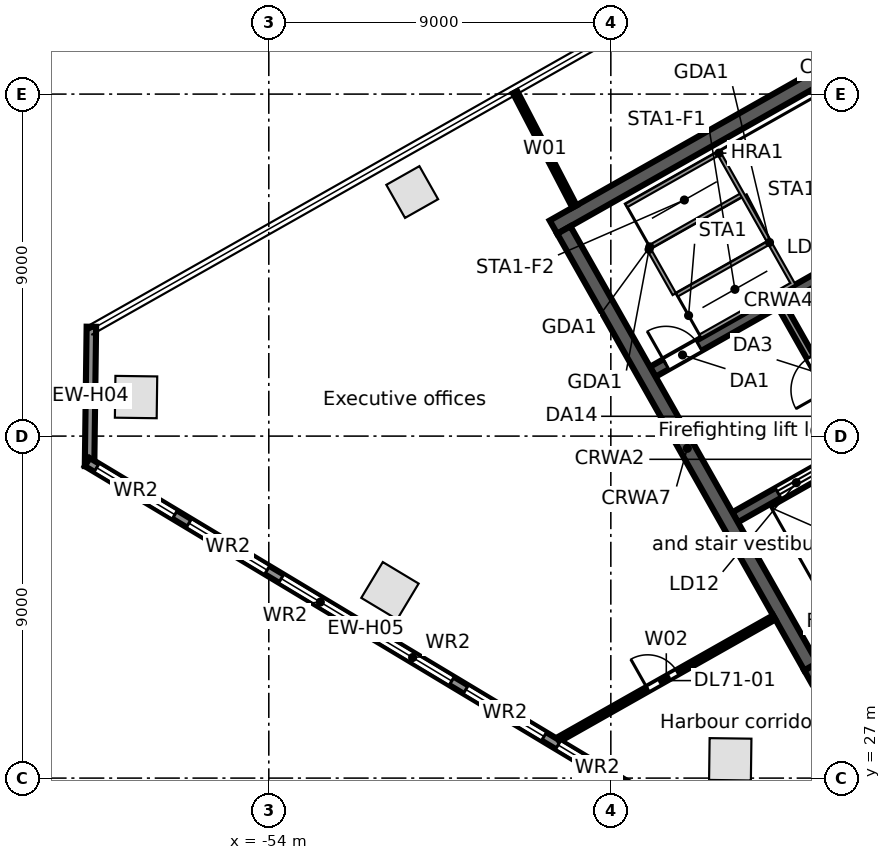
"""IFC4 building model, lengths in metres.
Left out: names, types, materials, properties, quantities, classifications, styles, units other than length and angle.
Written with IfcOpenShell. Run it as: python <this file> out.ifc"""

import sys

from ifc_helpers import new_model, si_unit, direction, frame, frame_2d, origin, origin_2d, place, context, subcontext, project, spatial, rectangle, extrude, element, fill, save


model = new_model("IFC4")
c1 = context("Model", 3, precision=1e-05, world=origin(), true_north=direction((0.0, 1.0)))
c2 = subcontext(c1, "Body", "Model", "MODEL_VIEW")
j1 = project(units=[si_unit("LENGTHUNIT", "METRE"), si_unit("PLANEANGLEUNIT", "RADIAN")], contexts=[c1])
p1 = place(None, origin())
s1 = spatial("IfcSite", under=j1, at=p1, CompositionType="ELEMENT")
p2 = place(p1, origin())
s2 = spatial("IfcBuilding", under=s1, at=p2, CompositionType="ELEMENT")
p3 = place(p2, frame((0.0, 0.0, 324.1)))
s3 = spatial("IfcBuildingStorey", under=s2, at=p3, CompositionType="ELEMENT", Elevation=324.1)
p4 = place(p3, frame((-50.226, 42.423, 0.0), z_axis=(0.0, 0.0, 1.0), x_axis=(-0.87035569594, -0.492423560103, 0.0)))
e1 = element("IfcColumn", 1, at=p4, inside=s3, PredefinedType="COLUMN", context=c2, shape_type="SweptSolid", body=[
    extrude(rectangle(XDim=1.0, YDim=1.0, at=origin_2d()), origin(), (0.0, 0.0, 1.0), 3.8),
])
for number, where, z_axis, x_axis in (
    (2, (-57.493, 37.027, 0.0), (0.0, 0.0, 1.0), (-0.013, -1.0, 0.0)),
    (3, (-50.812, 31.931, 0.0), (0.0, 0.0, 1.0), (0.857, -0.515, 0.0)),
    (4, (-41.858, 27.495, 0.0), (0.0, 0.0, 1.0), (1.0, -0.013, 0.0)),
):
    element("IfcColumn", number, at=place(p3, frame(where, z_axis=z_axis, x_axis=x_axis)), inside=s3, PredefinedType="COLUMN", context=c2, shape_type="SweptSolid", body=[
        extrude(rectangle(XDim=1.1, YDim=1.1, at=origin_2d()), origin(), (0.0, 0.0, 1.0), 3.8),
    ])
p5 = place(p3, frame((-58.717, 35.208, 0.0), z_axis=(0.0, 0.0, 1.0), x_axis=(0.01310512158, 0.999914124207, 0.0)))
e5 = element("IfcWall", 5, at=p5, inside=s3, PredefinedType="STANDARD", context=c2, shape_type="SweptSolid", body=[
    extrude(rectangle(XDim=3.67, YDim=0.25, at=frame_2d((1.835, 0.0))), origin(), (0.0, 0.0, 1.0), 3.52),
])
p6 = place(p3, frame((-44.115, 26.507, 0.0), z_axis=(0.0, 0.0, 1.0), x_axis=(-0.857166583633, 0.515039268311, 0.0)))
e6 = element("IfcWall", 6, at=p6, inside=s3, PredefinedType="STANDARD", context=c2, shape_type="SweptSolid", body=[
    extrude(rectangle(XDim=17.106, YDim=0.25, at=frame_2d((8.553, 0.0))), origin(), (0.0, 0.0, 1.0), 3.52),
])
p7 = place(p6, frame((14.417, 0.0, 0.8)))
e7 = element("IfcOpeningElement", 7, at=p7, cuts=e6, PredefinedType="OPENING", context=c2, shape_type="SweptSolid", body=[
    extrude(rectangle(XDim=2.4, YDim=2.2, at=frame_2d((1.2, 1.1))), frame((0.0, 0.135, 0.0), z_axis=(0.0, -1.0, 0.0), x_axis=(1.0, 0.0, 0.0)), (0.0, 0.0, 1.0), 0.27),
])
p8 = place(p6, frame((11.584, 0.0, 0.8)))
e8 = element("IfcOpeningElement", 8, at=p8, cuts=e6, PredefinedType="OPENING", context=c2, shape_type="SweptSolid", body=[
    extrude(rectangle(XDim=2.4, YDim=2.2, at=frame_2d((1.2, 1.1))), frame((0.0, 0.135, 0.0), z_axis=(0.0, -1.0, 0.0), x_axis=(1.0, 0.0, 0.0)), (0.0, 0.0, 1.0), 0.27),
])
p9 = place(p6, frame((8.75, 0.0, 0.8)))
e9 = element("IfcOpeningElement", 9, at=p9, cuts=e6, PredefinedType="OPENING", context=c2, shape_type="SweptSolid", body=[
    extrude(rectangle(XDim=2.4, YDim=2.2, at=frame_2d((1.2, 1.1))), frame((0.0, 0.135, 0.0), z_axis=(0.0, -1.0, 0.0), x_axis=(1.0, 0.0, 0.0)), (0.0, 0.0, 1.0), 0.27),
])
p10 = place(p6, frame((5.917, 0.0, 0.8)))
e10 = element("IfcOpeningElement", 10, at=p10, cuts=e6, PredefinedType="OPENING", context=c2, shape_type="SweptSolid", body=[
    extrude(rectangle(XDim=2.4, YDim=2.2, at=frame_2d((1.2, 1.1))), frame((0.0, 0.135, 0.0), z_axis=(0.0, -1.0, 0.0), x_axis=(1.0, 0.0, 0.0)), (0.0, 0.0, 1.0), 0.27),
])
p11 = place(p6, frame((3.084, 0.0, 0.8)))
e11 = element("IfcOpeningElement", 11, at=p11, cuts=e6, PredefinedType="OPENING", context=c2, shape_type="SweptSolid", body=[
    extrude(rectangle(XDim=2.4, YDim=2.2, at=frame_2d((1.2, 1.1))), frame((0.0, 0.135, 0.0), z_axis=(0.0, -1.0, 0.0), x_axis=(1.0, 0.0, 0.0)), (0.0, 0.0, 1.0), 0.27),
])
p12 = place(p6, frame((0.25, 0.0, 0.8)))
e12 = element("IfcOpeningElement", 12, at=p12, cuts=e6, PredefinedType="OPENING", context=c2, shape_type="SweptSolid", body=[
    extrude(rectangle(XDim=2.4, YDim=2.2, at=frame_2d((1.2, 1.1))), frame((0.0, 0.135, 0.0), z_axis=(0.0, -1.0, 0.0), x_axis=(1.0, 0.0, 0.0)), (0.0, 0.0, 1.0), 0.27),
])
p13 = place(p3, frame((-39.813, 29.662, 0.0), z_axis=(0.0, 0.0, 1.0), x_axis=(0.870350116061, 0.492433422375, 0.0)))
e13 = element("IfcWall", 13, at=p13, inside=s3, PredefinedType="SOLIDWALL", context=c2, shape_type="SweptSolid", body=[
    extrude(rectangle(XDim=17.0, YDim=0.4, at=frame_2d((8.5, 0.0))), origin(), (0.0, 0.0, 1.0), 3.52),
])
p14 = place(p13, frame((7.2, 0.0, 0.0)))
e14 = element("IfcOpeningElement", 14, at=p14, cuts=e13, PredefinedType="OPENING", context=c2, shape_type="SweptSolid", body=[
    extrude(rectangle(XDim=1.2, YDim=2.1, at=frame_2d((0.6, 1.05))), frame((0.0, 0.21, 0.0), z_axis=(0.0, -1.0, 0.0), x_axis=(1.0, 0.0, 0.0)), (0.0, 0.0, 1.0), 0.42),
])
p15 = place(p3, frame((-41.73, 33.863, 0.0), z_axis=(0.0, 0.0, 1.0), x_axis=(0.870350800578, 0.492432212525, 0.0)))
e15 = element("IfcWall", 15, at=p15, inside=s3, PredefinedType="SOLIDWALL", context=c2, shape_type="SweptSolid", body=[
    extrude(rectangle(XDim=6.2, YDim=0.3, at=frame_2d((3.1, 0.0))), origin(), (0.0, 0.0, 1.0), 3.52),
])
p16 = place(p15, frame((1.3, 0.0, 0.0)))
e16 = element("IfcOpeningElement", 16, at=p16, cuts=e15, PredefinedType="OPENING", context=c2, shape_type="SweptSolid", body=[
    extrude(rectangle(XDim=1.1, YDim=2.1, at=frame_2d((0.55, 1.05))), frame((0.0, 0.16, 0.0), z_axis=(0.0, -1.0, 0.0), x_axis=(1.0, 0.0, 0.0)), (0.0, 0.0, 1.0), 0.32),
])
p17 = place(p15, frame((4.95, 0.0, 0.0)))
e17 = element("IfcOpeningElement", 17, at=p17, cuts=e15, PredefinedType="OPENING", context=c2, shape_type="SweptSolid", body=[
    extrude(rectangle(XDim=0.9, YDim=2.1, at=frame_2d((0.45, 1.05))), frame((0.0, 0.16, 0.0), z_axis=(0.0, -1.0, 0.0), x_axis=(1.0, 0.0, 0.0)), (0.0, 0.0, 1.0), 0.32),
])
p18 = place(p3, frame((-43.897, 37.692, 0.0), z_axis=(0.0, 0.0, 1.0), x_axis=(0.870356351998, 0.492422400523, 0.0)))
e18 = element("IfcWall", 18, at=p18, inside=s3, PredefinedType="SOLIDWALL", context=c2, shape_type="SweptSolid", body=[
    extrude(rectangle(XDim=7.6, YDim=0.3, at=frame_2d((3.8, 0.0))), origin(), (0.0, 0.0, 1.0), 3.52),
])
p19 = place(p18, frame((0.4, 0.0, 0.0)))
e19 = element("IfcOpeningElement", 19, at=p19, cuts=e18, PredefinedType="OPENING", context=c2, shape_type="SweptSolid", body=[
    extrude(rectangle(XDim=1.0, YDim=2.1, at=frame_2d((0.5, 1.05))), frame((0.0, 0.16, 0.0), z_axis=(0.0, -1.0, 0.0), x_axis=(1.0, 0.0, 0.0)), (0.0, 0.0, 1.0), 0.32),
])
p20 = place(p3, frame((-46.51, 41.499, 0.0), z_axis=(0.0, 0.0, 1.0), x_axis=(0.870356271124, 0.492422543467, 0.0)))
e20 = element("IfcWall", 20, at=p20, inside=s3, PredefinedType="SOLIDWALL", context=c2, shape_type="SweptSolid", body=[
    extrude(rectangle(XDim=17.0, YDim=0.4, at=frame_2d((8.5, 0.0))), origin(), (0.0, 0.0, 1.0), 3.52),
])
p21 = place(p3, frame((-46.238, 41.423, 0.0), z_axis=(0.0, 0.0, 1.0), x_axis=(0.492421663121, -0.870356769198, 0.0)))
e21 = element("IfcWall", 21, at=p21, inside=s3, PredefinedType="SOLIDWALL", context=c2, shape_type="SweptSolid", body=[
    extrude(rectangle(XDim=13.2, YDim=0.4, at=frame_2d((6.6, 0.0))), origin(), (0.0, 0.0, 1.0), 3.52),
])
p22 = place(p3, frame((-40.516, 39.433, 0.0), z_axis=(0.0, 0.0, 1.0), x_axis=(0.492453559952, -0.87033872216, 0.0)))
e22 = element("IfcWall", 22, at=p22, inside=s3, PredefinedType="PARTITIONING", context=c2, shape_type="SweptSolid", body=[
    extrude(rectangle(XDim=4.1, YDim=0.2, at=frame_2d((2.05, 0.0))), origin(), (0.0, 0.0, 1.0), 3.52),
])
p23 = place(p22, frame((1.55, 0.0, 0.0)))
e23 = element("IfcOpeningElement", 23, at=p23, cuts=e22, PredefinedType="OPENING", context=c2, shape_type="SweptSolid", body=[
    extrude(rectangle(XDim=1.0, YDim=2.1, at=frame_2d((0.5, 1.05))), frame((0.0, 0.11, 0.0), z_axis=(0.0, -1.0, 0.0), x_axis=(1.0, 0.0, 0.0)), (0.0, 0.0, 1.0), 0.22),
])
p24 = place(p3, frame((-47.517, 45.047, 0.0), z_axis=(0.0, 0.0, 1.0), x_axis=(0.460973607079, -0.887413845721, 0.0)))
e24 = element("IfcWall", 24, at=p24, inside=s3, PredefinedType="PARTITIONING", context=c2, shape_type="SweptSolid", body=[
    extrude(rectangle(XDim=3.386, YDim=0.125, at=frame_2d((1.693, 0.0))), origin(), (0.0, 0.0, 1.0), 2.888),
])
p25 = place(p3, frame((-46.381, 28.015, 0.0), z_axis=(0.0, 0.0, 1.0), x_axis=(0.870364232693, 0.492408471139, 0.0)))
e25 = element("IfcWall", 25, at=p25, inside=s3, PredefinedType="PARTITIONING", context=c2, shape_type="SweptSolid", body=[
    extrude(rectangle(XDim=6.527, YDim=0.125, at=frame_2d((3.264, 0.0))), origin(), (0.0, 0.0, 1.0), 2.8),
])
p26 = place(p25, frame((2.7, 0.0, 0.0)))
e26 = element("IfcOpeningElement", 26, at=p26, cuts=e25, PredefinedType="OPENING", context=c2, shape_type="SweptSolid", body=[
    extrude(rectangle(XDim=0.9, YDim=2.1, at=frame_2d((0.45, 1.05))), frame((0.0, 0.073, 0.0), z_axis=(0.0, -1.0, 0.0), x_axis=(1.0, 0.0, 0.0)), (0.0, 0.0, 1.0), 0.145),
])
p27 = place(p7, origin())
e27 = element("IfcWindow", 27, at=p27, inside=s3, PartitioningType="SINGLE_PANEL", PredefinedType="WINDOW", context=c2, shape_type="SweptSolid", body=[
    extrude(rectangle(XDim=2.4, YDim=2.2, at=frame_2d((1.2, 1.1))), frame((0.0, 0.03, 0.0), z_axis=(0.0, -1.0, 0.0), x_axis=(1.0, 0.0, 0.0)), (0.0, 0.0, 1.0), 0.06),
])
fill(e7, e27)
p28 = place(p8, origin())
e28 = element("IfcWindow", 28, at=p28, inside=s3, PartitioningType="SINGLE_PANEL", PredefinedType="WINDOW", context=c2, shape_type="SweptSolid", body=[
    extrude(rectangle(XDim=2.4, YDim=2.2, at=frame_2d((1.2, 1.1))), frame((0.0, 0.03, 0.0), z_axis=(0.0, -1.0, 0.0), x_axis=(1.0, 0.0, 0.0)), (0.0, 0.0, 1.0), 0.06),
])
fill(e8, e28)
p29 = place(p9, origin())
e29 = element("IfcWindow", 29, at=p29, inside=s3, PartitioningType="SINGLE_PANEL", PredefinedType="WINDOW", context=c2, shape_type="SweptSolid", body=[
    extrude(rectangle(XDim=2.4, YDim=2.2, at=frame_2d((1.2, 1.1))), frame((0.0, 0.03, 0.0), z_axis=(0.0, -1.0, 0.0), x_axis=(1.0, 0.0, 0.0)), (0.0, 0.0, 1.0), 0.06),
])
fill(e9, e29)
p30 = place(p10, origin())
e30 = element("IfcWindow", 30, at=p30, inside=s3, PartitioningType="SINGLE_PANEL", PredefinedType="WINDOW", context=c2, shape_type="SweptSolid", body=[
    extrude(rectangle(XDim=2.4, YDim=2.2, at=frame_2d((1.2, 1.1))), frame((0.0, 0.03, 0.0), z_axis=(0.0, -1.0, 0.0), x_axis=(1.0, 0.0, 0.0)), (0.0, 0.0, 1.0), 0.06),
])
fill(e10, e30)
p31 = place(p11, origin())
e31 = element("IfcWindow", 31, at=p31, inside=s3, PartitioningType="SINGLE_PANEL", PredefinedType="WINDOW", context=c2, shape_type="SweptSolid", body=[
    extrude(rectangle(XDim=2.4, YDim=2.2, at=frame_2d((1.2, 1.1))), frame((0.0, 0.03, 0.0), z_axis=(0.0, -1.0, 0.0), x_axis=(1.0, 0.0, 0.0)), (0.0, 0.0, 1.0), 0.06),
])
fill(e11, e31)
p32 = place(p12, origin())
e32 = element("IfcWindow", 32, at=p32, inside=s3, PartitioningType="SINGLE_PANEL", PredefinedType="WINDOW", context=c2, shape_type="SweptSolid", body=[
    extrude(rectangle(XDim=2.4, YDim=2.2, at=frame_2d((1.2, 1.1))), frame((0.0, 0.03, 0.0), z_axis=(0.0, -1.0, 0.0), x_axis=(1.0, 0.0, 0.0)), (0.0, 0.0, 1.0), 0.06),
])
fill(e12, e32)
p33 = place(p16, origin())
e33 = element("IfcDoor", 33, at=p33, inside=s3, OperationType="DOUBLE_DOOR_SLIDING", PredefinedType="DOOR", context=c2, shape_type="SweptSolid", body=[
    extrude(rectangle(XDim=1.1, YDim=2.1, at=frame_2d((0.55, 1.05))), frame((0.0, 0.025, 0.0), z_axis=(0.0, -1.0, 0.0), x_axis=(1.0, 0.0, 0.0)), (0.0, 0.0, 1.0), 0.05),
])
fill(e16, e33)
p34 = place(p19, origin())
e34 = element("IfcDoor", 34, at=p34, inside=s3, OperationType="SINGLE_SWING_LEFT", PredefinedType="DOOR", context=c2, shape_type="SweptSolid", body=[
    extrude(rectangle(XDim=1.0, YDim=2.1, at=frame_2d((0.5, 1.05))), frame((0.0, 0.025, 0.0), z_axis=(0.0, -1.0, 0.0), x_axis=(1.0, 0.0, 0.0)), (0.0, 0.0, 1.0), 0.05),
])
fill(e19, e34)
p35 = place(p23, frame((1.0, 0.0, 0.0), z_axis=(0.0, 0.0, 1.0), x_axis=(-1.0, 0.0, 0.0)))
e35 = element("IfcDoor", 35, at=p35, inside=s3, OperationType="SINGLE_SWING_LEFT", PredefinedType="DOOR", context=c2, shape_type="SweptSolid", body=[
    extrude(rectangle(XDim=1.0, YDim=2.1, at=frame_2d((0.5, 1.05))), frame((0.0, 0.025, 0.0), z_axis=(0.0, -1.0, 0.0), x_axis=(1.0, 0.0, 0.0)), (0.0, 0.0, 1.0), 0.05),
])
fill(e23, e35)
p36 = place(p26, origin())
e36 = element("IfcDoor", 36, at=p36, inside=s3, OperationType="SINGLE_SWING_LEFT", PredefinedType="DOOR", context=c2, shape_type="SweptSolid", body=[
    extrude(rectangle(XDim=0.9, YDim=2.1, at=frame_2d((0.45, 1.05))), frame((0.0, 0.025, 0.0), z_axis=(0.0, -1.0, 0.0), x_axis=(1.0, 0.0, 0.0)), (0.0, 0.0, 1.0), 0.05),
])
fill(e26, e36)
save(model, sys.argv[1])
